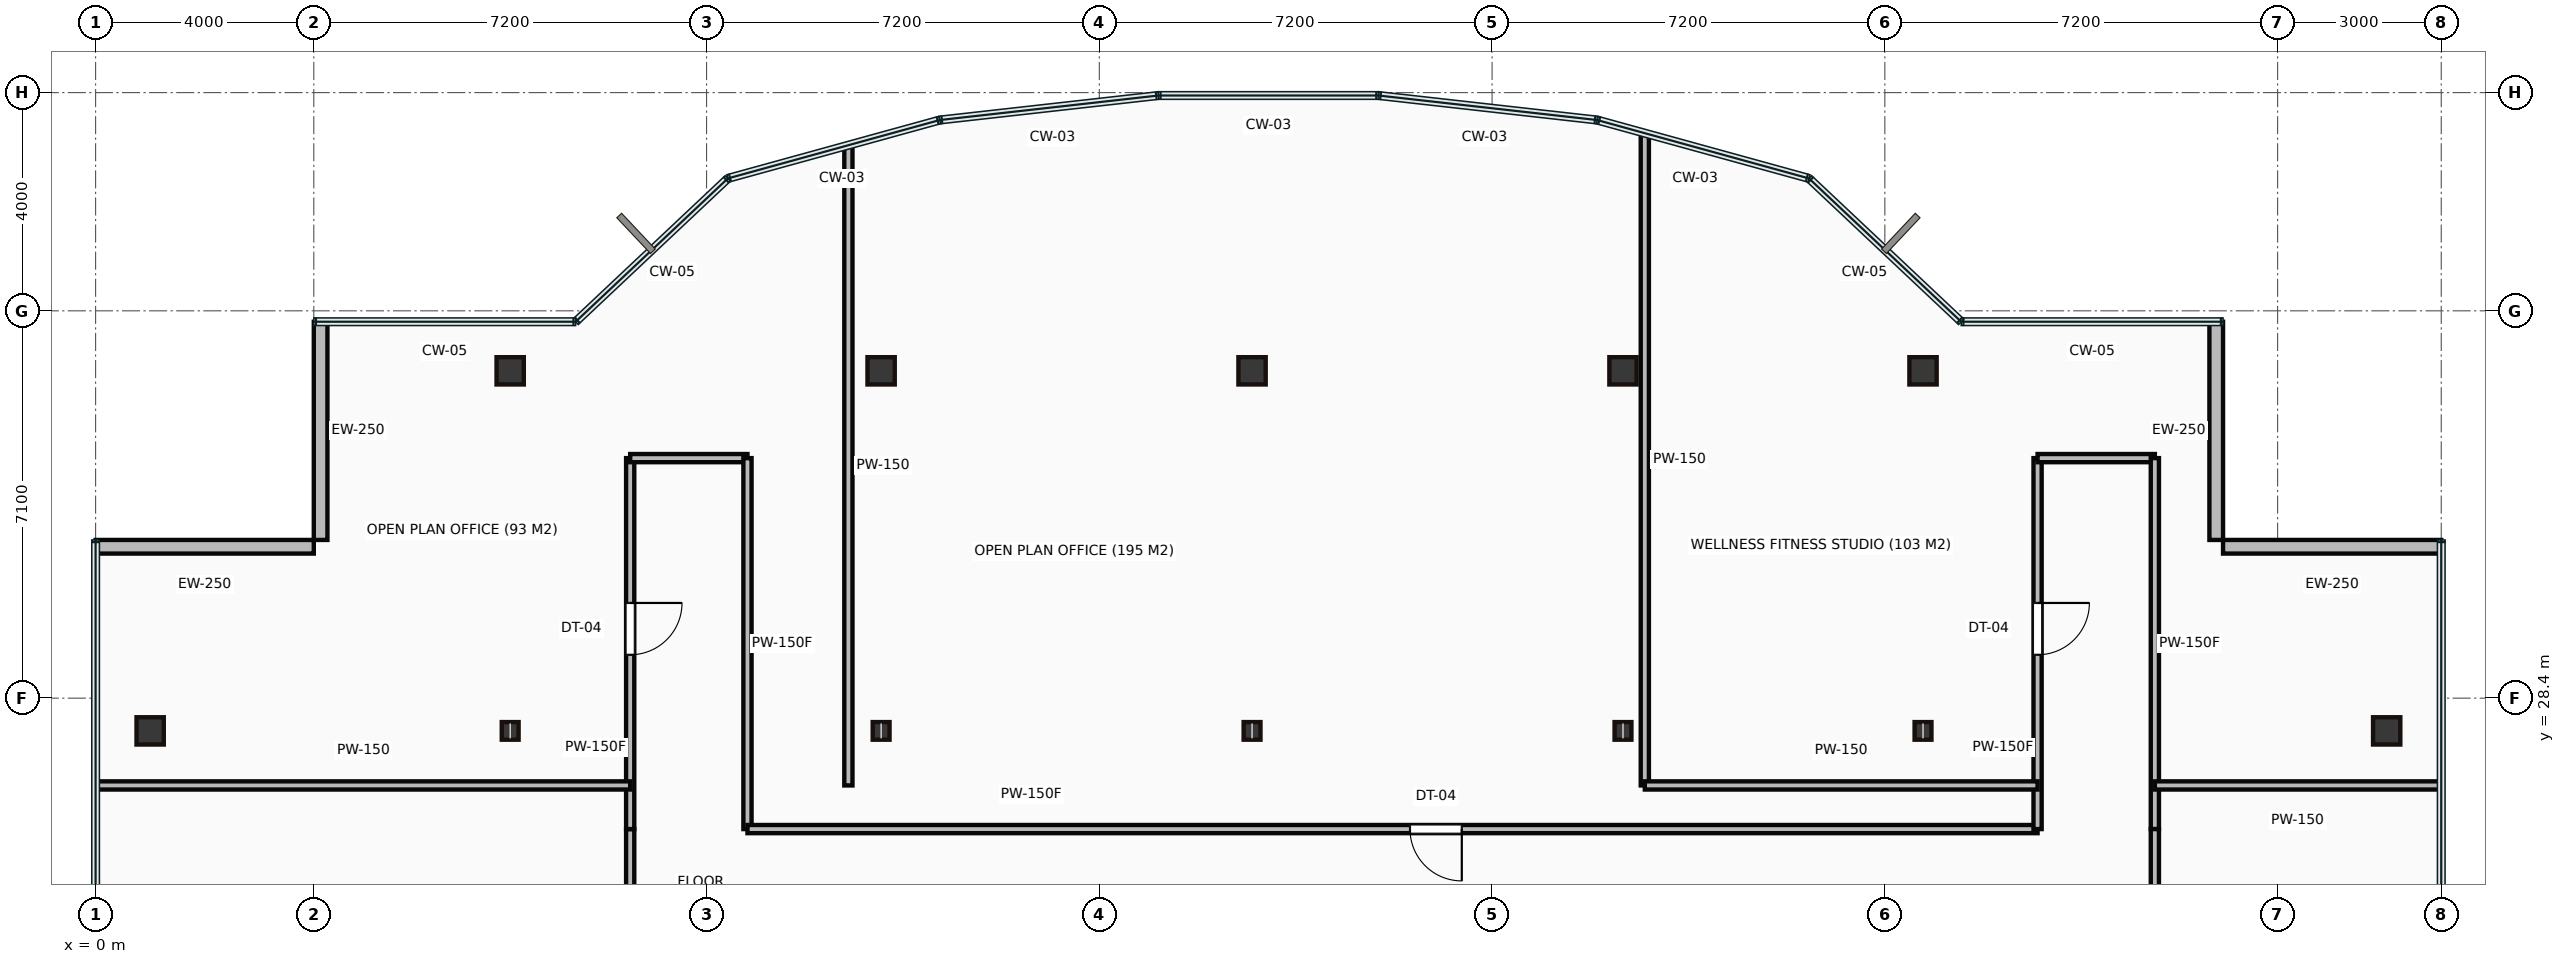
"""IFC4 building model, lengths in metres.
Left out: names, types, materials, properties, quantities, classifications, styles, units other than length and angle.
Written with IfcOpenShell. Run it as: python <this file> out.ifc"""

import sys

from ifc_helpers import new_model, si_unit, direction, frame, frame_2d, origin, origin_2d, place, context, subcontext, project, spatial, rectangle, hollow_rectangle, i_section, extrude, source, transform, mapped, element, fill, save


model = new_model("IFC4")
c1 = context("Model", 3, precision=1e-05, world=origin(), true_north=direction((0.0, 1.0)))
c2 = subcontext(c1, "Body", "Model", "MODEL_VIEW")
j1 = project(units=[si_unit("LENGTHUNIT", "METRE"), si_unit("PLANEANGLEUNIT", "RADIAN")], contexts=[c1])
p1 = place(None, origin())
s1 = spatial("IfcSite", under=j1, at=p1, CompositionType="ELEMENT")
p2 = place(p1, origin())
s2 = spatial("IfcBuilding", under=s1, at=p2, CompositionType="ELEMENT")
p3 = place(p2, frame((0.0, 0.0, 266.1)))
s3 = spatial("IfcBuildingStorey", under=s2, at=p3, CompositionType="ELEMENT", Elevation=266.1)
m1 = source(origin(), c2, "Body", "SweptSolid", [
    extrude(hollow_rectangle(XDim=0.5, YDim=0.5, WallThickness=0.022, at=origin_2d()), origin(), (0.0, 0.0, 1.0), 3.65),
])
p4 = place(p3, frame((1.0, 27.8, 0.0), z_axis=(0.0, 0.0, 1.0), x_axis=(1.0, 0.0, 0.0)))
e1 = element("IfcColumn", 1, at=p4, inside=s3, PredefinedType="COLUMN", context=c2, shape_type="MappedRepresentation", body=[
    mapped(m1, transform((0.0, 0.0, 0.0))),
])
m2 = source(origin(), c2, "Body", "SweptSolid", [
    extrude(i_section(OverallWidth=0.309, OverallDepth=0.323, WebThickness=0.014, FlangeThickness=0.023, at=origin_2d()), origin(), (0.0, 0.0, 1.0), 3.65),
])
p5 = place(p3, frame((7.6, 27.8, 0.0), z_axis=(0.0, 0.0, 1.0), x_axis=(1.0, 0.0, 0.0)))
e2 = element("IfcColumn", 2, at=p5, inside=s3, PredefinedType="COLUMN", context=c2, shape_type="MappedRepresentation", body=[
    mapped(m2, transform((0.0, 0.0, 0.0))),
])
p6 = place(p3, frame((7.6, 34.4, 0.0), z_axis=(0.0, 0.0, 1.0), x_axis=(1.0, 0.0, 0.0)))
e3 = element("IfcColumn", 3, at=p6, inside=s3, PredefinedType="COLUMN", context=c2, shape_type="MappedRepresentation", body=[
    mapped(m1, transform((0.0, 0.0, 0.0))),
])
p7 = place(p3, frame((14.4, 27.8, 0.0), z_axis=(0.0, 0.0, 1.0), x_axis=(1.0, 0.0, 0.0)))
e4 = element("IfcColumn", 4, at=p7, inside=s3, PredefinedType="COLUMN", context=c2, shape_type="MappedRepresentation", body=[
    mapped(m2, transform((0.0, 0.0, 0.0))),
])
p8 = place(p3, frame((14.4, 34.4, 0.0), z_axis=(0.0, 0.0, 1.0), x_axis=(1.0, 0.0, 0.0)))
e5 = element("IfcColumn", 5, at=p8, inside=s3, PredefinedType="COLUMN", context=c2, shape_type="MappedRepresentation", body=[
    mapped(m1, transform((0.0, 0.0, 0.0))),
])
p9 = place(p3, frame((21.2, 27.8, 0.0), z_axis=(0.0, 0.0, 1.0), x_axis=(1.0, 0.0, 0.0)))
e6 = element("IfcColumn", 6, at=p9, inside=s3, PredefinedType="COLUMN", context=c2, shape_type="MappedRepresentation", body=[
    mapped(m2, transform((0.0, 0.0, 0.0))),
])
p10 = place(p3, frame((21.2, 34.4, 0.0), z_axis=(0.0, 0.0, 1.0), x_axis=(1.0, 0.0, 0.0)))
e7 = element("IfcColumn", 7, at=p10, inside=s3, PredefinedType="COLUMN", context=c2, shape_type="MappedRepresentation", body=[
    mapped(m1, transform((0.0, 0.0, 0.0))),
])
p11 = place(p3, frame((28.0, 27.8, 0.0), z_axis=(0.0, 0.0, 1.0), x_axis=(1.0, 0.0, 0.0)))
e8 = element("IfcColumn", 8, at=p11, inside=s3, PredefinedType="COLUMN", context=c2, shape_type="MappedRepresentation", body=[
    mapped(m2, transform((0.0, 0.0, 0.0))),
])
p12 = place(p3, frame((28.0, 34.4, 0.0), z_axis=(0.0, 0.0, 1.0), x_axis=(1.0, 0.0, 0.0)))
e9 = element("IfcColumn", 9, at=p12, inside=s3, PredefinedType="COLUMN", context=c2, shape_type="MappedRepresentation", body=[
    mapped(m1, transform((0.0, 0.0, 0.0))),
])
p13 = place(p3, frame((33.5, 27.8, 0.0), z_axis=(0.0, 0.0, 1.0), x_axis=(1.0, 0.0, 0.0)))
e10 = element("IfcColumn", 10, at=p13, inside=s3, PredefinedType="COLUMN", context=c2, shape_type="MappedRepresentation", body=[
    mapped(m2, transform((0.0, 0.0, 0.0))),
])
for number, where, z_axis, x_axis in (
    (11, (33.5, 34.4, 0.0), (0.0, 0.0, 1.0), (1.0, 0.0, 0.0)),
    (12, (42.0, 27.8, 0.0), (0.0, 0.0, 1.0), (1.0, 0.0, 0.0)),
):
    element("IfcColumn", number, at=place(p3, frame(where, z_axis=z_axis, x_axis=x_axis)), inside=s3, PredefinedType="COLUMN", context=c2, shape_type="MappedRepresentation", body=[
        mapped(m1, transform((0.0, 0.0, 0.0))),
    ])
m3 = source(origin(), c2, "Body", "SweptSolid", [
    extrude(rectangle(XDim=4.0, YDim=0.25, at=frame_2d((2.0, 0.0))), origin(), (0.0, 0.0, 1.0), 3.4),
])
for number, where, z_axis, x_axis in (
    (13, (43.0, 31.175, 0.0), (0.0, 0.0, 1.0), (-1.0, 0.0, 0.0)),
    (14, (38.875, 31.3, 0.0), (0.0, 0.0, 1.0), (0.0, 1.0, 0.0)),
    (15, (4.125, 35.3, 0.0), (0.0, 0.0, 1.0), (0.0, -1.0, 0.0)),
    (16, (4.0, 31.175, 0.0), (0.0, 0.0, 1.0), (-1.0, 0.0, 0.0)),
):
    element("IfcWall", number, at=place(p3, frame(where, z_axis=z_axis, x_axis=x_axis)), inside=s3, PredefinedType="STANDARD", context=c2, shape_type="MappedRepresentation", body=[
        mapped(m3, transform((0.0, 0.0, 0.0))),
    ])
m4 = source(origin(), c2, "Body", "SweptSolid", [
    extrude(rectangle(XDim=2.0, YDim=0.15, at=frame_2d((1.0, 0.0))), origin(), (0.0, 0.0, 1.0), 3.4),
])
p14 = place(p3, frame((9.8, 24.0, 0.0), z_axis=(0.0, 0.0, 1.0), x_axis=(0.0, 1.0, 0.0)))
e17 = element("IfcWall", 17, at=p14, inside=s3, PredefinedType="PARTITIONING", context=c2, shape_type="MappedRepresentation", body=[
    mapped(m4, transform((0.0, 0.0, 0.0))),
])
m5 = source(origin(), c2, "Body", "SweptSolid", [
    extrude(rectangle(XDim=6.8, YDim=0.15, at=frame_2d((3.4, 0.0))), origin(), (0.0, 0.0, 1.0), 3.4),
])
p15 = place(p3, frame((9.8, 26.0, 0.0), z_axis=(0.0, 0.0, 1.0), x_axis=(0.0, 1.0, 0.0)))
e18 = element("IfcWall", 18, at=p15, inside=s3, PredefinedType="PARTITIONING", context=c2, shape_type="MappedRepresentation", body=[
    mapped(m5, transform((0.0, 0.0, 0.0))),
])
p16 = place(p15, frame((3.195, 0.0, 0.0)))
e19 = element("IfcOpeningElement", 19, at=p16, cuts=e18, PredefinedType="OPENING", context=c2, shape_type="SweptSolid", body=[
    extrude(rectangle(XDim=0.95, YDim=2.15, at=frame_2d((0.475, 1.075))), frame((0.0, 0.085, 0.0), z_axis=(0.0, -1.0, 0.0), x_axis=(1.0, 0.0, 0.0)), (0.0, 0.0, 1.0), 0.17),
])
m6 = source(origin(), c2, "Body", "SweptSolid", [
    extrude(rectangle(XDim=2.15, YDim=0.15, at=frame_2d((1.075, 0.0))), origin(), (0.0, 0.0, 1.0), 3.4),
])
p17 = place(p3, frame((9.8, 32.8, 0.0), z_axis=(0.0, 0.0, 1.0), x_axis=(1.0, 0.0, 0.0)))
e20 = element("IfcWall", 20, at=p17, inside=s3, PredefinedType="PARTITIONING", context=c2, shape_type="MappedRepresentation", body=[
    mapped(m6, transform((0.0, 0.0, 0.0))),
])
p18 = place(p3, frame((11.95, 32.8, 0.0), z_axis=(0.0, 0.0, 1.0), x_axis=(0.0, -1.0, 0.0)))
e21 = element("IfcWall", 21, at=p18, inside=s3, PredefinedType="PARTITIONING", context=c2, shape_type="MappedRepresentation", body=[
    mapped(m5, transform((0.0, 0.0, 0.0))),
])
m7 = source(origin(), c2, "Body", "SweptSolid", [
    extrude(rectangle(XDim=23.65, YDim=0.15, at=frame_2d((11.825, 0.0))), origin(), (0.0, 0.0, 1.0), 3.4),
])
p19 = place(p3, frame((11.95, 26.0, 0.0), z_axis=(0.0, 0.0, 1.0), x_axis=(1.0, 0.0, 0.0)))
e22 = element("IfcWall", 22, at=p19, inside=s3, PredefinedType="PARTITIONING", context=c2, shape_type="MappedRepresentation", body=[
    mapped(m7, transform((0.0, 0.0, 0.0))),
])
p20 = place(p19, frame((12.145, 0.0, 0.0)))
e23 = element("IfcOpeningElement", 23, at=p20, cuts=e22, PredefinedType="OPENING", context=c2, shape_type="SweptSolid", body=[
    extrude(rectangle(XDim=0.95, YDim=2.15, at=frame_2d((0.475, 1.075))), frame((0.0, 0.085, 0.0), z_axis=(0.0, -1.0, 0.0), x_axis=(1.0, 0.0, 0.0)), (0.0, 0.0, 1.0), 0.17),
])
p21 = place(p3, frame((35.6, 26.0, 0.0), z_axis=(0.0, 0.0, 1.0), x_axis=(0.0, 1.0, 0.0)))
e24 = element("IfcWall", 24, at=p21, inside=s3, PredefinedType="PARTITIONING", context=c2, shape_type="MappedRepresentation", body=[
    mapped(m5, transform((0.0, 0.0, 0.0))),
])
p22 = place(p21, frame((3.195, 0.0, 0.0)))
e25 = element("IfcOpeningElement", 25, at=p22, cuts=e24, PredefinedType="OPENING", context=c2, shape_type="SweptSolid", body=[
    extrude(rectangle(XDim=0.95, YDim=2.15, at=frame_2d((0.475, 1.075))), frame((0.0, 0.085, 0.0), z_axis=(0.0, -1.0, 0.0), x_axis=(1.0, 0.0, 0.0)), (0.0, 0.0, 1.0), 0.17),
])
p23 = place(p3, frame((35.6, 32.8, 0.0), z_axis=(0.0, 0.0, 1.0), x_axis=(1.0, 0.0, 0.0)))
e26 = element("IfcWall", 26, at=p23, inside=s3, PredefinedType="PARTITIONING", context=c2, shape_type="MappedRepresentation", body=[
    mapped(m6, transform((0.0, 0.0, 0.0))),
])
p24 = place(p3, frame((37.75, 32.8, 0.0), z_axis=(0.0, 0.0, 1.0), x_axis=(0.0, -1.0, 0.0)))
e27 = element("IfcWall", 27, at=p24, inside=s3, PredefinedType="PARTITIONING", context=c2, shape_type="MappedRepresentation", body=[
    mapped(m5, transform((0.0, 0.0, 0.0))),
])
p25 = place(p3, frame((37.75, 26.0, 0.0), z_axis=(0.0, 0.0, 1.0), x_axis=(0.0, -1.0, 0.0)))
e28 = element("IfcWall", 28, at=p25, inside=s3, PredefinedType="PARTITIONING", context=c2, shape_type="MappedRepresentation", body=[
    mapped(m4, transform((0.0, 0.0, 0.0))),
])
m8 = source(origin(), c2, "Body", "SweptSolid", [
    extrude(rectangle(XDim=9.78, YDim=0.15, at=frame_2d((4.89, 0.0))), origin(), (0.0, 0.0, 1.0), 3.4),
])
p26 = place(p3, frame((0.02, 26.8, 0.0), z_axis=(0.0, 0.0, 1.0), x_axis=(1.0, 0.0, 0.0)))
e29 = element("IfcWall", 29, at=p26, inside=s3, PredefinedType="PARTITIONING", context=c2, shape_type="MappedRepresentation", body=[
    mapped(m8, transform((0.0, 0.0, 0.0))),
])
m9 = source(origin(), c2, "Body", "SweptSolid", [
    extrude(rectangle(XDim=11.715, YDim=0.15, at=frame_2d((5.857, 0.0))), origin(), (0.0, 0.0, 1.0), 3.4),
])
p27 = place(p3, frame((13.8, 38.515, 0.0), z_axis=(0.0, 0.0, 1.0), x_axis=(0.0, -1.0, 0.0)))
e30 = element("IfcWall", 30, at=p27, inside=s3, PredefinedType="PARTITIONING", context=c2, shape_type="MappedRepresentation", body=[
    mapped(m9, transform((0.0, 0.0, 0.0))),
])
m10 = source(origin(), c2, "Body", "SweptSolid", [
    extrude(rectangle(XDim=11.935, YDim=0.15, at=frame_2d((5.968, 0.0))), origin(), (0.0, 0.0, 1.0), 3.4),
])
p28 = place(p3, frame((28.4, 38.735, 0.0), z_axis=(0.0, 0.0, 1.0), x_axis=(0.0, -1.0, 0.0)))
e31 = element("IfcWall", 31, at=p28, inside=s3, PredefinedType="PARTITIONING", context=c2, shape_type="MappedRepresentation", body=[
    mapped(m10, transform((0.0, 0.0, 0.0))),
])
m11 = source(origin(), c2, "Body", "SweptSolid", [
    extrude(rectangle(XDim=7.2, YDim=0.15, at=frame_2d((3.6, 0.0))), origin(), (0.0, 0.0, 1.0), 3.4),
])
p29 = place(p3, frame((28.4, 26.8, 0.0), z_axis=(0.0, 0.0, 1.0), x_axis=(1.0, 0.0, 0.0)))
e32 = element("IfcWall", 32, at=p29, inside=s3, PredefinedType="PARTITIONING", context=c2, shape_type="MappedRepresentation", body=[
    mapped(m11, transform((0.0, 0.0, 0.0))),
])
m12 = source(origin(), c2, "Body", "SweptSolid", [
    extrude(rectangle(XDim=5.23, YDim=0.15, at=frame_2d((2.615, 0.0))), origin(), (0.0, 0.0, 1.0), 3.4),
])
p30 = place(p3, frame((42.98, 26.8, 0.0), z_axis=(0.0, 0.0, 1.0), x_axis=(-1.0, 0.0, 0.0)))
e33 = element("IfcWall", 33, at=p30, inside=s3, PredefinedType="PARTITIONING", context=c2, shape_type="MappedRepresentation", body=[
    mapped(m12, transform((0.0, 0.0, 0.0))),
])
m13 = source(origin(), c2, "Body", "SweptSolid", [
    extrude(rectangle(XDim=0.95, YDim=2.15, at=frame_2d((0.475, 1.075))), frame((0.0, 0.025, 0.0), z_axis=(0.0, -1.0, 0.0), x_axis=(1.0, 0.0, 0.0)), (0.0, 0.0, 1.0), 0.05),
])
p31 = place(p16, origin())
e34 = element("IfcDoor", 34, at=p31, inside=s3, OperationType="SINGLE_SWING_RIGHT", PredefinedType="DOOR", context=c2, shape_type="MappedRepresentation", body=[
    mapped(m13, transform((0.0, 0.0, 0.0))),
])
fill(e19, e34)
p32 = place(p20, origin())
e35 = element("IfcDoor", 35, at=p32, inside=s3, OperationType="SINGLE_SWING_RIGHT", PredefinedType="DOOR", context=c2, shape_type="MappedRepresentation", body=[
    mapped(m13, transform((0.0, 0.0, 0.0))),
])
fill(e23, e35)
p33 = place(p22, origin())
e36 = element("IfcDoor", 36, at=p33, inside=s3, OperationType="SINGLE_SWING_RIGHT", PredefinedType="DOOR", context=c2, shape_type="MappedRepresentation", body=[
    mapped(m13, transform((0.0, 0.0, 0.0))),
])
fill(e25, e36)
save(model, sys.argv[1])
